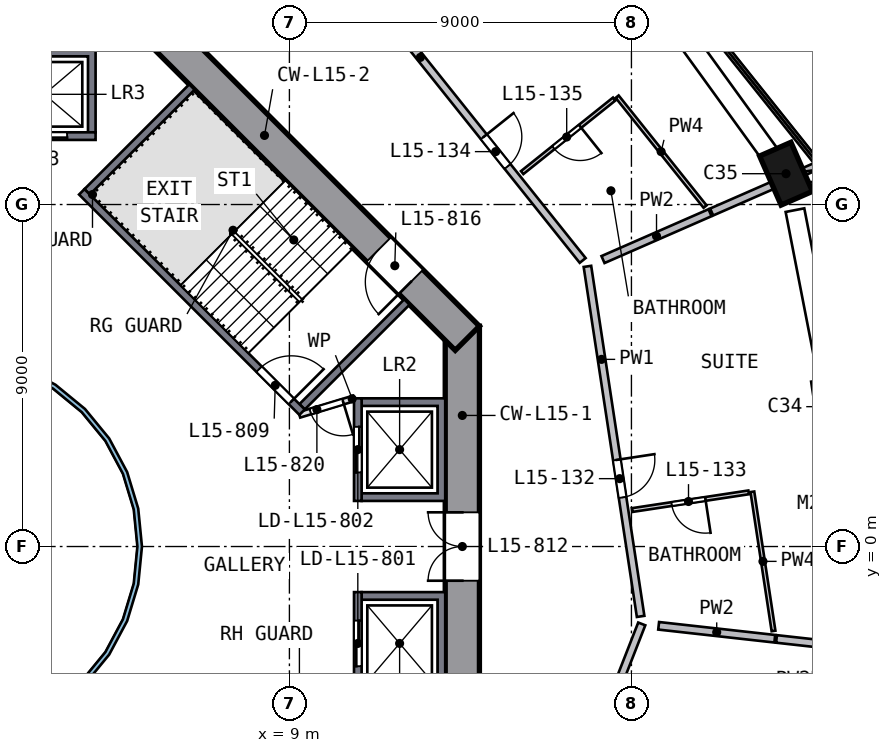
"""IFC4 building model, lengths in metres.
Left out: names, types, materials, properties, quantities, classifications, styles, units other than length and angle.
Written with IfcOpenShell. Run it as: python <this file> out.ifc"""

import sys

from ifc_helpers import new_model, si_unit, direction, frame, frame_2d, origin, origin_2d, place, context, subcontext, project, spatial, polyline, rectangle, outline, extrude, element, fill, save


model = new_model("IFC4")
c1 = context("Model", 3, precision=1e-05, world=origin(), true_north=direction((0.0, 1.0)))
c2 = subcontext(c1, "Body", "Model", "MODEL_VIEW")
j1 = project(units=[si_unit("LENGTHUNIT", "METRE"), si_unit("PLANEANGLEUNIT", "RADIAN")], contexts=[c1])
p1 = place(None, origin())
s1 = spatial("IfcSite", under=j1, at=p1, CompositionType="ELEMENT")
p2 = place(p1, origin())
s2 = spatial("IfcBuilding", under=s1, at=p2, CompositionType="ELEMENT")
p3 = place(p2, frame((0.0, 0.0, 68.0)))
s3 = spatial("IfcBuildingStorey", under=s2, at=p3, CompositionType="ELEMENT", Elevation=68.0)
p4 = place(p3, frame((23.34, 3.547, 0.0), z_axis=(-0.01779579, 0.110881458, 0.993674299), x_axis=(-0.149132846, 0.982419922, -0.112296444)))
e1 = element("IfcColumn", 1, at=p4, inside=s3, PredefinedType="COLUMN", context=c2, shape_type="SweptSolid", body=[
    extrude(rectangle(XDim=1.4, YDim=0.9, at=origin_2d()), origin(), (0.0, 0.0, 1.0), 3.21),
])
p5 = place(p3, frame((22.125, 9.684, 0.0), z_axis=(-0.046909277, 0.104842615, 0.993381873), x_axis=(0.397994334, -0.910169761, 0.114854325)))
e2 = element("IfcColumn", 2, at=p5, inside=s3, PredefinedType="COLUMN", context=c2, shape_type="SweptSolid", body=[
    extrude(rectangle(XDim=1.4, YDim=0.9, at=origin_2d()), origin(), (0.0, 0.0, 1.0), 3.211),
])
p6 = place(p3, frame((13.55, -5.799, 0.0), z_axis=(0.0, 0.0, 1.0), x_axis=(0.0, 1.0, 0.0)))
e3 = element("IfcWall", 3, at=p6, inside=s3, PredefinedType="SHEAR", context=c2, shape_type="SweptSolid", body=[
    extrude(rectangle(XDim=11.598, YDim=0.9, at=frame_2d((5.799, 0.0))), origin(), (0.0, 0.0, 1.0), 3.5),
])
p7 = place(p6, frame((4.899, 0.0, 0.0)))
e4 = element("IfcOpeningElement", 4, at=p7, cuts=e3, PredefinedType="OPENING", context=c2, shape_type="SweptSolid", body=[
    extrude(rectangle(XDim=1.8, YDim=2.1, at=frame_2d((0.9, 1.05))), frame((0.0, 0.46, 0.0), z_axis=(0.0, -1.0, 0.0), x_axis=(1.0, 0.0, 0.0)), (0.0, 0.0, 1.0), 0.92),
])
p8 = place(p3, frame((13.682, 5.481, 0.0), z_axis=(0.0, 0.0, 1.0), x_axis=(-0.707106781, 0.707106781, 0.0)))
e5 = element("IfcWall", 5, at=p8, inside=s3, PredefinedType="SHEAR", context=c2, shape_type="SweptSolid", body=[
    extrude(rectangle(XDim=11.598, YDim=0.9, at=frame_2d((5.799, 0.0))), origin(), (0.0, 0.0, 1.0), 3.5),
])
p9 = place(p8, frame((2.099, 0.0, 0.0)))
e6 = element("IfcOpeningElement", 6, at=p9, cuts=e5, PredefinedType="OPENING", context=c2, shape_type="SweptSolid", body=[
    extrude(rectangle(XDim=1.2, YDim=2.1, at=frame_2d((0.6, 1.05))), frame((0.0, 0.46, 0.0), z_axis=(0.0, -1.0, 0.0), x_axis=(1.0, 0.0, 0.0)), (0.0, 0.0, 1.0), 0.92),
])
p10 = place(p3, origin())
e7 = element("IfcWall", 7, at=p10, inside=s3, PredefinedType="SOLIDWALL", context=c2, shape_type="SweptSolid", body=[
    extrude(outline(polyline([(13.1, -3.9), (10.9, -3.9), (10.9, -3.7), (12.9, -3.7), (12.9, -1.4), (10.9, -1.4), (10.9, -1.2), (13.1, -1.2), (13.1, -3.9)])), origin(), (0.0, 0.0, 1.0), 3.19),
])
p11 = place(p3, frame((10.8, -1.2, 0.0), z_axis=(0.0, 0.0, 1.0), x_axis=(0.0, -1.0, 0.0)))
e8 = element("IfcWall", 8, at=p11, inside=s3, PredefinedType="SOLIDWALL", context=c2, shape_type="SweptSolid", body=[
    extrude(rectangle(XDim=2.7, YDim=0.2, at=frame_2d((1.35, 0.0))), origin(), (0.0, 0.0, 1.0), 3.19),
])
p12 = place(p11, frame((0.75, 0.0, 0.0)))
e9 = element("IfcOpeningElement", 9, at=p12, cuts=e8, PredefinedType="OPENING", context=c2, shape_type="SweptSolid", body=[
    extrude(rectangle(XDim=1.2, YDim=2.1, at=frame_2d((0.6, 1.05))), frame((0.0, 0.11, 0.0), z_axis=(0.0, -1.0, 0.0), x_axis=(1.0, 0.0, 0.0)), (0.0, 0.0, 1.0), 0.22),
])
p13 = place(p3, origin())
e10 = element("IfcWall", 10, at=p13, inside=s3, PredefinedType="SOLIDWALL", context=c2, shape_type="SweptSolid", body=[
    extrude(outline(polyline([(13.1, 3.9), (13.1, 1.2), (10.9, 1.2), (10.9, 1.4), (12.9, 1.4), (12.9, 3.7), (10.9, 3.7), (10.9, 3.9), (13.1, 3.9)])), origin(), (0.0, 0.0, 1.0), 3.19),
])
p14 = place(p3, frame((10.8, 1.2, 0.0), z_axis=(0.0, 0.0, 1.0), x_axis=(0.0, 1.0, 0.0)))
e11 = element("IfcWall", 11, at=p14, inside=s3, PredefinedType="SOLIDWALL", context=c2, shape_type="SweptSolid", body=[
    extrude(rectangle(XDim=2.7, YDim=0.2, at=frame_2d((1.35, 0.0))), origin(), (0.0, 0.0, 1.0), 3.19),
])
p15 = place(p14, frame((0.75, 0.0, 0.0)))
e12 = element("IfcOpeningElement", 12, at=p15, cuts=e11, PredefinedType="OPENING", context=c2, shape_type="SweptSolid", body=[
    extrude(rectangle(XDim=1.2, YDim=2.1, at=frame_2d((0.6, 1.05))), frame((0.0, 0.11, 0.0), z_axis=(0.0, -1.0, 0.0), x_axis=(1.0, 0.0, 0.0)), (0.0, 0.0, 1.0), 0.22),
])
p16 = place(p3, origin())
e13 = element("IfcWall", 13, at=p16, inside=s3, PredefinedType="SOLIDWALL", context=c2, shape_type="SweptSolid", body=[
    extrude(outline(polyline([(3.9, 13.1), (3.9, 10.9), (3.7, 10.9), (3.7, 12.9), (1.4, 12.9), (1.4, 10.9), (1.2, 10.9), (1.2, 13.1), (3.9, 13.1)])), origin(), (0.0, 0.0, 1.0), 3.19),
])
p17 = place(p3, frame((1.2, 10.8, 0.0), z_axis=(0.0, 0.0, 1.0), x_axis=(1.0, 0.0, 0.0)))
e14 = element("IfcWall", 14, at=p17, inside=s3, PredefinedType="SOLIDWALL", context=c2, shape_type="SweptSolid", body=[
    extrude(rectangle(XDim=2.7, YDim=0.2, at=frame_2d((1.35, 0.0))), origin(), (0.0, 0.0, 1.0), 3.19),
])
p18 = place(p17, frame((0.75, 0.0, 0.0)))
e15 = element("IfcOpeningElement", 15, at=p18, cuts=e14, PredefinedType="OPENING", context=c2, shape_type="SweptSolid", body=[
    extrude(rectangle(XDim=1.2, YDim=2.1, at=frame_2d((0.6, 1.05))), frame((0.0, 0.11, 0.0), z_axis=(0.0, -1.0, 0.0), x_axis=(1.0, 0.0, 0.0)), (0.0, 0.0, 1.0), 0.22),
])
p19 = place(p3, frame((3.535, 9.334, 0.0), z_axis=(0.0, 0.0, 1.0), x_axis=(0.707106781, -0.707106781, 0.0)))
e16 = element("IfcWall", 16, at=p19, inside=s3, PredefinedType="SOLIDWALL", context=c2, shape_type="SweptSolid", body=[
    extrude(rectangle(XDim=8.2, YDim=0.2, at=frame_2d((4.1, 0.0))), origin(), (0.0, 0.0, 1.0), 3.19),
])
p20 = place(p19, frame((6.6, 0.0, 0.0)))
e17 = element("IfcOpeningElement", 17, at=p20, cuts=e16, PredefinedType="OPENING", context=c2, shape_type="SweptSolid", body=[
    extrude(rectangle(XDim=1.2, YDim=2.1, at=frame_2d((0.6, 1.05))), frame((0.0, 0.11, 0.0), z_axis=(0.0, -1.0, 0.0), x_axis=(1.0, 0.0, 0.0)), (0.0, 0.0, 1.0), 0.22),
])
for number, where, z_axis, x_axis in (
    (18, (9.334, 3.677, 0.0), (0.0, 0.0, 1.0), (0.707, 0.707, 0.0)),
    (19, (3.677, 9.334, 0.0), (0.0, 0.0, 1.0), (0.707, 0.707, 0.0)),
):
    element("IfcWall", number, at=place(p3, frame(where, z_axis=z_axis, x_axis=x_axis)), inside=s3, PredefinedType="SOLIDWALL", context=c2, shape_type="SweptSolid", body=[
        extrude(rectangle(XDim=3.9, YDim=0.2, at=frame_2d((1.95, 0.0))), origin(), (0.0, 0.0, 1.0), 3.19),
    ])
p21 = place(p3, frame((10.7, 3.9, 0.0), z_axis=(0.0, 0.0, 1.0), x_axis=(-0.957084567, -0.289808785, 0.0)))
e20 = element("IfcWall", 20, at=p21, inside=s3, PredefinedType="PARTITIONING", context=c2, shape_type="SweptSolid", body=[
    extrude(rectangle(XDim=1.501, YDim=0.15, at=frame_2d((0.75, 0.0))), origin(), (0.0, 0.0, 1.0), 3.19),
])
p22 = place(p21, frame((0.301, 0.0, 0.0)))
e21 = element("IfcOpeningElement", 21, at=p22, cuts=e20, PredefinedType="OPENING", context=c2, shape_type="SweptSolid", body=[
    extrude(rectangle(XDim=0.9, YDim=2.1, at=frame_2d((0.45, 1.05))), frame((0.0, 0.085, 0.0), z_axis=(0.0, -1.0, 0.0), x_axis=(1.0, 0.0, 0.0)), (0.0, 0.0, 1.0), 0.17),
])
p23 = place(p3, origin())
e22 = element("IfcWall", 22, at=p23, inside=s3, PredefinedType="SOLIDWALL", context=c2, shape_type="SweptSolid", body=[
    extrude(outline(polyline([(5.021, -0.999), (4.73, -1.959), (4.257, -2.844), (3.62, -3.62), (2.844, -4.257), (1.959, -4.73), (0.999, -5.021), (0.0, -5.12), (-0.999, -5.021), (-1.959, -4.73), (-2.844, -4.257), (-3.62, -3.62), (-4.257, -2.844), (-4.73, -1.959), (-5.021, -0.999), (-5.12, 0.0), (-5.021, 0.999), (-4.73, 1.959), (-4.257, 2.844), (-3.62, 3.62), (-2.844, 4.257), (-1.959, 4.73), (-0.999, 5.021), (0.0, 5.12), (0.999, 5.021), (1.959, 4.73), (2.844, 4.257), (3.62, 3.62), (4.257, 2.844), (4.73, 1.959), (5.021, 0.999), (5.12, 0.0), (5.021, -0.999)]), holes=[polyline([(4.904, 0.976), (4.619, 1.913), (4.157, 2.778), (3.535, 3.535), (2.778, 4.157), (1.913, 4.619), (0.976, 4.904), (0.0, 5.0), (-0.976, 4.904), (-1.913, 4.619), (-2.778, 4.157), (-3.535, 3.535), (-4.157, 2.778), (-4.619, 1.913), (-4.904, 0.976), (-5.0, 0.0), (-4.904, -0.976), (-4.619, -1.913), (-4.157, -2.778), (-3.535, -3.535), (-2.778, -4.157), (-1.913, -4.619), (-0.976, -4.904), (0.0, -5.0), (0.976, -4.904), (1.913, -4.619), (2.778, -4.157), (3.535, -3.535), (4.157, -2.778), (4.619, -1.913), (4.904, -0.976), (5.0, 0.0), (4.904, 0.976)])]), origin(), (0.0, 0.0, 1.0), 3.19),
])
p24 = place(p3, frame((10.9, 14.805, 0.0), z_axis=(0.0, 0.0, 1.0), x_axis=(0.624423357, -0.781086085, 0.0)))
e23 = element("IfcWall", 23, at=p24, inside=s3, PredefinedType="SOLIDWALL", context=c2, shape_type="SweptSolid", body=[
    extrude(rectangle(XDim=9.316, YDim=0.2, at=frame_2d((4.658, 0.0))), origin(), (0.0, 0.0, 1.0), 3.19),
])
p25 = place(p24, frame((5.15, 0.0, 0.0)))
e24 = element("IfcOpeningElement", 24, at=p25, cuts=e23, PredefinedType="OPENING", context=c2, shape_type="SweptSolid", body=[
    extrude(rectangle(XDim=1.0, YDim=2.1, at=frame_2d((0.5, 1.05))), frame((0.0, 0.11, 0.0), z_axis=(0.0, -1.0, 0.0), x_axis=(1.0, 0.0, 0.0)), (0.0, 0.0, 1.0), 0.22),
])
p26 = place(p3, frame((16.842, 7.372, 0.0), z_axis=(0.0, 0.0, 1.0), x_axis=(0.150231533, -0.988650842, 0.0)))
e25 = element("IfcWall", 25, at=p26, inside=s3, PredefinedType="SOLIDWALL", context=c2, shape_type="SweptSolid", body=[
    extrude(rectangle(XDim=9.317, YDim=0.2, at=frame_2d((4.658, 0.0))), origin(), (0.0, 0.0, 1.0), 3.19),
])
p27 = place(p26, frame((5.15, 0.0, 0.0)))
e26 = element("IfcOpeningElement", 26, at=p27, cuts=e25, PredefinedType="OPENING", context=c2, shape_type="SweptSolid", body=[
    extrude(rectangle(XDim=1.0, YDim=2.1, at=frame_2d((0.5, 1.05))), frame((0.0, 0.11, 0.0), z_axis=(0.0, -1.0, 0.0), x_axis=(1.0, 0.0, 0.0)), (0.0, 0.0, 1.0), 0.22),
])
p28 = place(p3, frame((17.012, -5.257, 0.0), z_axis=(0.0, 0.0, 1.0), x_axis=(0.364210349, 0.931316714, 0.0)))
e27 = element("IfcWall", 27, at=p28, inside=s3, PredefinedType="SOLIDWALL", context=c2, shape_type="SweptSolid", body=[
    extrude(rectangle(XDim=3.458, YDim=0.2, at=frame_2d((1.729, 0.0))), origin(), (0.0, 0.0, 1.0), 3.19),
])
p29 = place(p3, frame((17.252, 7.552, 0.0), z_axis=(0.0, 0.0, 1.0), x_axis=(0.916111768, 0.400922971, 0.0)))
e28 = element("IfcWall", 28, at=p29, inside=s3, PredefinedType="SOLIDWALL", context=c2, shape_type="SweptSolid", body=[
    extrude(rectangle(XDim=3.074, YDim=0.2, at=frame_2d((1.537, 0.0))), origin(), (0.0, 0.0, 1.0), 3.19),
])
p30 = place(p3, frame((18.716, -2.086, 0.0), z_axis=(0.0, 0.0, 1.0), x_axis=(0.993846884, -0.110762675, 0.0)))
e29 = element("IfcWall", 29, at=p30, inside=s3, PredefinedType="SOLIDWALL", context=c2, shape_type="SweptSolid", body=[
    extrude(rectangle(XDim=3.075, YDim=0.2, at=frame_2d((1.537, 0.0))), origin(), (0.0, 0.0, 1.0), 3.19),
])
p31 = place(p3, frame((20.11, 8.803, 0.0), z_axis=(0.0, 0.0, 1.0), x_axis=(0.91609034, 0.400971931, 0.0)))
e30 = element("IfcWall", 30, at=p31, inside=s3, PredefinedType="SOLIDWALL", context=c2, shape_type="SweptSolid", body=[
    extrude(rectangle(XDim=3.011, YDim=0.2, at=frame_2d((1.506, 0.0))), origin(), (0.0, 0.0, 1.0), 3.19),
])
p32 = place(p3, frame((21.817, -2.432, 0.0), z_axis=(0.0, 0.0, 1.0), x_axis=(0.993849082, -0.110742952, 0.0)))
e31 = element("IfcWall", 31, at=p32, inside=s3, PredefinedType="SOLIDWALL", context=c2, shape_type="SweptSolid", body=[
    extrude(rectangle(XDim=3.011, YDim=0.2, at=frame_2d((1.506, 0.0))), origin(), (0.0, 0.0, 1.0), 2.69),
])
p33 = place(p3, frame((17.546, 11.776, 0.0), z_axis=(0.0, 0.0, 1.0), x_axis=(-0.781076214, -0.624435703, 0.0)))
e32 = element("IfcWall", 32, at=p33, inside=s3, PredefinedType="PARTITIONING", context=c2, shape_type="SweptSolid", body=[
    extrude(rectangle(XDim=3.1, YDim=0.1, at=frame_2d((1.55, 0.0))), origin(), (0.0, 0.0, 1.0), 3.19),
])
p34 = place(p33, frame((1.15, 0.0, 0.0)))
e33 = element("IfcOpeningElement", 33, at=p34, cuts=e32, PredefinedType="OPENING", context=c2, shape_type="SweptSolid", body=[
    extrude(rectangle(XDim=0.9, YDim=2.1, at=frame_2d((0.45, 1.05))), frame((0.0, 0.06, 0.0), z_axis=(0.0, -1.0, 0.0), x_axis=(1.0, 0.0, 0.0)), (0.0, 0.0, 1.0), 0.12),
])
p35 = place(p3, frame((17.625, 11.838, 0.0), z_axis=(0.0, 0.0, 1.0), x_axis=(0.624413662, -0.781093835, 0.0)))
e34 = element("IfcWall", 34, at=p35, inside=s3, PredefinedType="PARTITIONING", context=c2, shape_type="SweptSolid", body=[
    extrude(rectangle(XDim=3.704, YDim=0.1, at=frame_2d((1.852, 0.0))), origin(), (0.0, 0.0, 1.0), 3.19),
])
p36 = place(p3, frame((21.083, 1.425, 0.0), z_axis=(0.0, 0.0, 1.0), x_axis=(-0.988656748, -0.150192657, 0.0)))
e35 = element("IfcWall", 35, at=p36, inside=s3, PredefinedType="PARTITIONING", context=c2, shape_type="SweptSolid", body=[
    extrude(rectangle(XDim=3.1, YDim=0.1, at=frame_2d((1.55, 0.0))), origin(), (0.0, 0.0, 1.0), 3.19),
])
p37 = place(p36, frame((1.15, 0.0, 0.0)))
e36 = element("IfcOpeningElement", 36, at=p37, cuts=e35, PredefinedType="OPENING", context=c2, shape_type="SweptSolid", body=[
    extrude(rectangle(XDim=0.9, YDim=2.1, at=frame_2d((0.45, 1.05))), frame((0.0, 0.06, 0.0), z_axis=(0.0, -1.0, 0.0), x_axis=(1.0, 0.0, 0.0)), (0.0, 0.0, 1.0), 0.12),
])
p38 = place(p3, frame((21.182, 1.44, 0.0), z_axis=(0.0, 0.0, 1.0), x_axis=(0.150219315, -0.988652698, 0.0)))
e37 = element("IfcWall", 37, at=p38, inside=s3, PredefinedType="PARTITIONING", context=c2, shape_type="SweptSolid", body=[
    extrude(rectangle(XDim=3.704, YDim=0.1, at=frame_2d((1.852, 0.0))), origin(), (0.0, 0.0, 1.0), 3.19),
])
p39 = place(p12, origin())
e38 = element("IfcDoor", 38, at=p39, inside=s3, OperationType="DOUBLE_DOOR_SLIDING", PredefinedType="DOOR", context=c2, shape_type="SweptSolid", body=[
    extrude(rectangle(XDim=1.2, YDim=2.1, at=frame_2d((0.6, 1.05))), frame((0.0, 0.025, 0.0), z_axis=(0.0, -1.0, 0.0), x_axis=(1.0, 0.0, 0.0)), (0.0, 0.0, 1.0), 0.05),
])
fill(e9, e38)
p40 = place(p15, origin())
e39 = element("IfcDoor", 39, at=p40, inside=s3, OperationType="DOUBLE_DOOR_SLIDING", PredefinedType="DOOR", context=c2, shape_type="SweptSolid", body=[
    extrude(rectangle(XDim=1.2, YDim=2.1, at=frame_2d((0.6, 1.05))), frame((0.0, 0.025, 0.0), z_axis=(0.0, -1.0, 0.0), x_axis=(1.0, 0.0, 0.0)), (0.0, 0.0, 1.0), 0.05),
])
fill(e12, e39)
p41 = place(p18, origin())
e40 = element("IfcDoor", 40, at=p41, inside=s3, OperationType="DOUBLE_DOOR_SLIDING", PredefinedType="DOOR", context=c2, shape_type="SweptSolid", body=[
    extrude(rectangle(XDim=1.2, YDim=2.1, at=frame_2d((0.6, 1.05))), frame((0.0, 0.025, 0.0), z_axis=(0.0, -1.0, 0.0), x_axis=(1.0, 0.0, 0.0)), (0.0, 0.0, 1.0), 0.05),
])
fill(e15, e40)
p42 = place(p20, origin())
e41 = element("IfcDoor", 41, at=p42, inside=s3, OperationType="SINGLE_SWING_RIGHT", PredefinedType="DOOR", context=c2, shape_type="SweptSolid", body=[
    extrude(rectangle(XDim=1.2, YDim=2.1, at=frame_2d((0.6, 1.05))), frame((0.0, 0.025, 0.0), z_axis=(0.0, -1.0, 0.0), x_axis=(1.0, 0.0, 0.0)), (0.0, 0.0, 1.0), 0.05),
])
fill(e17, e41)
p43 = place(p7, origin())
e42 = element("IfcDoor", 42, at=p43, inside=s3, OperationType="DOUBLE_DOOR_SINGLE_SWING", PredefinedType="DOOR", context=c2, shape_type="SweptSolid", body=[
    extrude(rectangle(XDim=1.8, YDim=2.1, at=frame_2d((0.9, 1.05))), frame((0.0, 0.025, 0.0), z_axis=(0.0, -1.0, 0.0), x_axis=(1.0, 0.0, 0.0)), (0.0, 0.0, 1.0), 0.05),
])
fill(e4, e42)
p44 = place(p9, origin())
e43 = element("IfcDoor", 43, at=p44, inside=s3, OperationType="SINGLE_SWING_LEFT", PredefinedType="DOOR", context=c2, shape_type="SweptSolid", body=[
    extrude(rectangle(XDim=1.2, YDim=2.1, at=frame_2d((0.6, 1.05))), frame((0.0, 0.025, 0.0), z_axis=(0.0, -1.0, 0.0), x_axis=(1.0, 0.0, 0.0)), (0.0, 0.0, 1.0), 0.05),
])
fill(e6, e43)
p45 = place(p22, origin())
e44 = element("IfcDoor", 44, at=p45, inside=s3, OperationType="SINGLE_SWING_LEFT", PredefinedType="DOOR", context=c2, shape_type="SweptSolid", body=[
    extrude(rectangle(XDim=0.9, YDim=2.1, at=frame_2d((0.45, 1.05))), frame((0.0, 0.025, 0.0), z_axis=(0.0, -1.0, 0.0), x_axis=(1.0, 0.0, 0.0)), (0.0, 0.0, 1.0), 0.05),
])
fill(e21, e44)
p46 = place(p27, origin())
e45 = element("IfcDoor", 45, at=p46, inside=s3, OperationType="SINGLE_SWING_LEFT", PredefinedType="DOOR", context=c2, shape_type="SweptSolid", body=[
    extrude(rectangle(XDim=1.0, YDim=2.1, at=frame_2d((0.5, 1.05))), frame((0.0, 0.025, 0.0), z_axis=(0.0, -1.0, 0.0), x_axis=(1.0, 0.0, 0.0)), (0.0, 0.0, 1.0), 0.05),
])
fill(e26, e45)
p47 = place(p37, origin())
e46 = element("IfcDoor", 46, at=p47, inside=s3, OperationType="SINGLE_SWING_LEFT", PredefinedType="DOOR", context=c2, shape_type="SweptSolid", body=[
    extrude(rectangle(XDim=0.9, YDim=2.1, at=frame_2d((0.45, 1.05))), frame((0.0, 0.025, 0.0), z_axis=(0.0, -1.0, 0.0), x_axis=(1.0, 0.0, 0.0)), (0.0, 0.0, 1.0), 0.05),
])
fill(e36, e46)
p48 = place(p25, origin())
e47 = element("IfcDoor", 47, at=p48, inside=s3, OperationType="SINGLE_SWING_LEFT", PredefinedType="DOOR", context=c2, shape_type="SweptSolid", body=[
    extrude(rectangle(XDim=1.0, YDim=2.1, at=frame_2d((0.5, 1.05))), frame((0.0, 0.025, 0.0), z_axis=(0.0, -1.0, 0.0), x_axis=(1.0, 0.0, 0.0)), (0.0, 0.0, 1.0), 0.05),
])
fill(e24, e47)
p49 = place(p34, origin())
e48 = element("IfcDoor", 48, at=p49, inside=s3, OperationType="SINGLE_SWING_LEFT", PredefinedType="DOOR", context=c2, shape_type="SweptSolid", body=[
    extrude(rectangle(XDim=0.9, YDim=2.1, at=frame_2d((0.45, 1.05))), frame((0.0, 0.025, 0.0), z_axis=(0.0, -1.0, 0.0), x_axis=(1.0, 0.0, 0.0)), (0.0, 0.0, 1.0), 0.05),
])
fill(e33, e48)
save(model, sys.argv[1])
